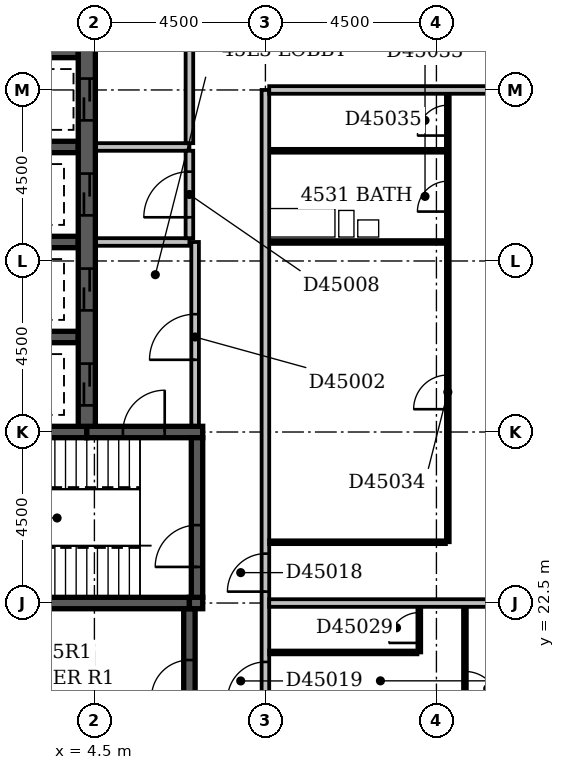
"""IFC4 building model, lengths in metres.
Left out: names, types, materials, properties, quantities, classifications, styles, units other than length and angle.
Written with IfcOpenShell. Run it as: python <this file> out.ifc"""

import sys

from ifc_helpers import new_model, si_unit, direction, frame, frame_2d, origin, place, context, subcontext, project, spatial, rectangle, extrude, element, fill, save


model = new_model("IFC4")
c1 = context("Model", 3, precision=1e-05, world=origin(), true_north=direction((0.0, 1.0)))
c2 = subcontext(c1, "Body", "Model", "MODEL_VIEW")
j1 = project(units=[si_unit("LENGTHUNIT", "METRE"), si_unit("PLANEANGLEUNIT", "RADIAN")], contexts=[c1])
p1 = place(None, origin())
s1 = spatial("IfcSite", under=j1, at=p1, CompositionType="ELEMENT")
p2 = place(p1, origin())
s2 = spatial("IfcBuilding", under=s1, at=p2, CompositionType="ELEMENT")
p3 = place(p2, frame((0.0, 0.0, 179.0)))
s3 = spatial("IfcBuildingStorey", under=s2, at=p3, CompositionType="ELEMENT", Elevation=179.0)
p4 = place(p3, frame((0.35, 22.5, -0.3), z_axis=(0.0, 0.0, 1.0), x_axis=(1.0, 0.0, 0.0)))
e1 = element("IfcWall", 1, at=p4, inside=s3, PredefinedType="SHEAR", context=c2, shape_type="SweptSolid", body=[
    extrude(rectangle(XDim=6.65, YDim=0.3, at=frame_2d((3.325, 0.0))), origin(), (0.0, 0.0, 1.0), 3.6),
])
p5 = place(p3, frame((0.35, 27.0, -0.3), z_axis=(0.0, 0.0, 1.0), x_axis=(1.0, 0.0, 0.0)))
e2 = element("IfcWall", 2, at=p5, inside=s3, PredefinedType="SHEAR", context=c2, shape_type="SweptSolid", body=[
    extrude(rectangle(XDim=3.95, YDim=0.3, at=frame_2d((1.975, 0.0))), origin(), (0.0, 0.0, 1.0), 3.6),
])
for number, where, z_axis, x_axis in (
    (3, (0.725, 29.5, -0.3), (0.0, 0.0, 1.0), (1.0, 0.0, 0.0)),
    (4, (0.725, 32.0, -0.3), (0.0, 0.0, 1.0), (1.0, 0.0, 0.0)),
    (5, (0.725, 34.5, -0.3), (0.0, 0.0, 1.0), (1.0, 0.0, 0.0)),
    (6, (0.725, 37.0, -0.3), (0.0, 0.0, 1.0), (1.0, 0.0, 0.0)),
):
    element("IfcWall", number, at=place(p3, frame(where, z_axis=z_axis, x_axis=x_axis)), inside=s3, PredefinedType="SHEAR", context=c2, shape_type="SweptSolid", body=[
        extrude(rectangle(XDim=3.35, YDim=0.3, at=frame_2d((1.675, 0.0))), origin(), (0.0, 0.0, 1.0), 3.6),
    ])
p6 = place(p3, frame((4.3, 27.0, -0.3), z_axis=(0.0, 0.0, 1.0), x_axis=(1.0, 0.0, 0.0)))
e7 = element("IfcWall", 7, at=p6, inside=s3, PredefinedType="SHEAR", context=c2, shape_type="SweptSolid", body=[
    extrude(rectangle(XDim=3.05, YDim=0.3, at=frame_2d((1.525, 0.0))), origin(), (0.0, 0.0, 1.0), 3.6),
])
p7 = place(p6, frame((0.95, 0.0, 0.3)))
e8 = element("IfcOpeningElement", 8, at=p7, cuts=e7, PredefinedType="OPENING", context=c2, shape_type="SweptSolid", body=[
    extrude(rectangle(XDim=1.1, YDim=2.1, at=frame_2d((0.55, 1.05))), frame((0.0, 0.162, 0.0), z_axis=(0.0, -1.0, 0.0), x_axis=(1.0, 0.0, 0.0)), (0.0, 0.0, 1.0), 0.324),
])
p8 = place(p3, frame((4.3, 27.15, -0.3), z_axis=(0.0, 0.0, 1.0), x_axis=(0.0, 1.0, 0.0)))
e9 = element("IfcWall", 9, at=p8, inside=s3, PredefinedType="SHEAR", context=c2, shape_type="SweptSolid", body=[
    extrude(rectangle(XDim=22.125, YDim=0.45, at=frame_2d((11.062, 0.0))), origin(), (0.0, 0.0, 1.0), 3.6),
])
p9 = place(p8, frame((3.05, 0.0, 0.3)))
e10 = element("IfcOpeningElement", 10, at=p9, cuts=e9, PredefinedType="OPENING", context=c2, shape_type="SweptSolid", body=[
    extrude(rectangle(XDim=1.1, YDim=2.1, at=frame_2d((0.55, 1.05))), frame((0.0, 0.237, 0.0), z_axis=(0.0, -1.0, 0.0), x_axis=(1.0, 0.0, 0.0)), (0.0, 0.0, 1.0), 0.474),
])
p10 = place(p8, frame((0.55, 0.0, 0.3)))
e11 = element("IfcOpeningElement", 11, at=p10, cuts=e9, PredefinedType="OPENING", context=c2, shape_type="SweptSolid", body=[
    extrude(rectangle(XDim=1.1, YDim=2.1, at=frame_2d((0.55, 1.05))), frame((0.0, 0.237, 0.0), z_axis=(0.0, -1.0, 0.0), x_axis=(1.0, 0.0, 0.0)), (0.0, 0.0, 1.0), 0.474),
])
p11 = place(p8, frame((20.55, 0.0, 0.3)))
e12 = element("IfcOpeningElement", 12, at=p11, cuts=e9, PredefinedType="OPENING", context=c2, shape_type="SweptSolid", body=[
    extrude(rectangle(XDim=1.1, YDim=2.1, at=frame_2d((0.55, 1.05))), frame((0.0, 0.237, 0.0), z_axis=(0.0, -1.0, 0.0), x_axis=(1.0, 0.0, 0.0)), (0.0, 0.0, 1.0), 0.474),
])
p12 = place(p8, frame((18.05, 0.0, 0.3)))
e13 = element("IfcOpeningElement", 13, at=p12, cuts=e9, PredefinedType="OPENING", context=c2, shape_type="SweptSolid", body=[
    extrude(rectangle(XDim=1.1, YDim=2.1, at=frame_2d((0.55, 1.05))), frame((0.0, 0.237, 0.0), z_axis=(0.0, -1.0, 0.0), x_axis=(1.0, 0.0, 0.0)), (0.0, 0.0, 1.0), 0.474),
])
p13 = place(p8, frame((15.55, 0.0, 0.3)))
e14 = element("IfcOpeningElement", 14, at=p13, cuts=e9, PredefinedType="OPENING", context=c2, shape_type="SweptSolid", body=[
    extrude(rectangle(XDim=1.1, YDim=2.1, at=frame_2d((0.55, 1.05))), frame((0.0, 0.237, 0.0), z_axis=(0.0, -1.0, 0.0), x_axis=(1.0, 0.0, 0.0)), (0.0, 0.0, 1.0), 0.474),
])
p14 = place(p8, frame((13.05, 0.0, 0.3)))
e15 = element("IfcOpeningElement", 15, at=p14, cuts=e9, PredefinedType="OPENING", context=c2, shape_type="SweptSolid", body=[
    extrude(rectangle(XDim=1.1, YDim=2.1, at=frame_2d((0.55, 1.05))), frame((0.0, 0.237, 0.0), z_axis=(0.0, -1.0, 0.0), x_axis=(1.0, 0.0, 0.0)), (0.0, 0.0, 1.0), 0.474),
])
p15 = place(p8, frame((10.55, 0.0, 0.3)))
e16 = element("IfcOpeningElement", 16, at=p15, cuts=e9, PredefinedType="OPENING", context=c2, shape_type="SweptSolid", body=[
    extrude(rectangle(XDim=1.1, YDim=2.1, at=frame_2d((0.55, 1.05))), frame((0.0, 0.237, 0.0), z_axis=(0.0, -1.0, 0.0), x_axis=(1.0, 0.0, 0.0)), (0.0, 0.0, 1.0), 0.474),
])
p16 = place(p8, frame((8.05, 0.0, 0.3)))
e17 = element("IfcOpeningElement", 17, at=p16, cuts=e9, PredefinedType="OPENING", context=c2, shape_type="SweptSolid", body=[
    extrude(rectangle(XDim=1.1, YDim=2.1, at=frame_2d((0.55, 1.05))), frame((0.0, 0.237, 0.0), z_axis=(0.0, -1.0, 0.0), x_axis=(1.0, 0.0, 0.0)), (0.0, 0.0, 1.0), 0.474),
])
p17 = place(p8, frame((5.55, 0.0, 0.3)))
e18 = element("IfcOpeningElement", 18, at=p17, cuts=e9, PredefinedType="OPENING", context=c2, shape_type="SweptSolid", body=[
    extrude(rectangle(XDim=1.1, YDim=2.1, at=frame_2d((0.55, 1.05))), frame((0.0, 0.237, 0.0), z_axis=(0.0, -1.0, 0.0), x_axis=(1.0, 0.0, 0.0)), (0.0, 0.0, 1.0), 0.474),
])
p18 = place(p3, frame((7.0, 18.65, -0.3), z_axis=(0.0, 0.0, 1.0), x_axis=(0.0, 1.0, 0.0)))
e19 = element("IfcWall", 19, at=p18, inside=s3, PredefinedType="SHEAR", context=c2, shape_type="SweptSolid", body=[
    extrude(rectangle(XDim=3.7, YDim=0.3, at=frame_2d((1.85, 0.0))), origin(), (0.0, 0.0, 1.0), 3.6),
])
p19 = place(p18, frame((1.35, 0.0, 0.3)))
e20 = element("IfcOpeningElement", 20, at=p19, cuts=e19, PredefinedType="OPENING", context=c2, shape_type="SweptSolid", body=[
    extrude(rectangle(XDim=1.0, YDim=2.1, at=frame_2d((0.5, 1.05))), frame((0.0, 0.162, 0.0), z_axis=(0.0, -1.0, 0.0), x_axis=(1.0, 0.0, 0.0)), (0.0, 0.0, 1.0), 0.324),
])
p20 = place(p3, frame((7.0, 22.5, -0.3), z_axis=(0.0, 0.0, 1.0), x_axis=(1.0, 0.0, 0.0)))
e21 = element("IfcWall", 21, at=p20, inside=s3, PredefinedType="SHEAR", context=c2, shape_type="SweptSolid", body=[
    extrude(rectangle(XDim=0.35, YDim=0.3, at=frame_2d((0.175, 0.0))), origin(), (0.0, 0.0, 1.0), 3.6),
])
p21 = place(p3, frame((7.2, 22.65, -0.3), z_axis=(0.0, 0.0, 1.0), x_axis=(0.0, 1.0, 0.0)))
e22 = element("IfcWall", 22, at=p21, inside=s3, PredefinedType="SHEAR", context=c2, shape_type="SweptSolid", body=[
    extrude(rectangle(XDim=4.2, YDim=0.3, at=frame_2d((2.1, 0.0))), origin(), (0.0, 0.0, 1.0), 3.6),
])
p22 = place(p21, frame((0.8, 0.0, 0.3)))
e23 = element("IfcOpeningElement", 23, at=p22, cuts=e22, PredefinedType="OPENING", context=c2, shape_type="SweptSolid", body=[
    extrude(rectangle(XDim=1.1, YDim=2.1, at=frame_2d((0.55, 1.05))), frame((0.0, 0.162, 0.0), z_axis=(0.0, -1.0, 0.0), x_axis=(1.0, 0.0, 0.0)), (0.0, 0.0, 1.0), 0.324),
])
p23 = place(p3, frame((4.545, 34.5, 0.0), z_axis=(0.0, 0.0, 1.0), x_axis=(1.0, 0.0, 0.0)))
e24 = element("IfcWall", 24, at=p23, inside=s3, PredefinedType="PARTITIONING", context=c2, shape_type="SweptSolid", body=[
    extrude(rectangle(XDim=2.455, YDim=0.2, at=frame_2d((1.228, 0.0))), origin(), (0.0, 0.0, 1.0), 3.3),
])
p24 = place(p3, frame((7.0, 34.6, 0.0), z_axis=(0.0, 0.0, 1.0), x_axis=(0.0, 1.0, 0.0)))
e25 = element("IfcWall", 25, at=p24, inside=s3, PredefinedType="PARTITIONING", context=c2, shape_type="SweptSolid", body=[
    extrude(rectangle(XDim=14.9, YDim=0.2, at=frame_2d((7.45, 0.0))), origin(), (0.0, 0.0, 1.0), 3.3),
])
p25 = place(p24, frame((2.8, 0.0, 0.0)))
e26 = element("IfcOpeningElement", 26, at=p25, cuts=e25, PredefinedType="OPENING", context=c2, shape_type="SweptSolid", body=[
    extrude(rectangle(XDim=1.2, YDim=2.1, at=frame_2d((0.6, 1.05))), frame((0.0, 0.112, 0.0), z_axis=(0.0, -1.0, 0.0), x_axis=(1.0, 0.0, 0.0)), (0.0, 0.0, 1.0), 0.224),
])
p26 = place(p24, frame((9.8, 0.0, 0.0)))
e27 = element("IfcOpeningElement", 27, at=p26, cuts=e25, PredefinedType="OPENING", context=c2, shape_type="SweptSolid", body=[
    extrude(rectangle(XDim=1.2, YDim=2.1, at=frame_2d((0.6, 1.05))), frame((0.0, 0.112, 0.0), z_axis=(0.0, -1.0, 0.0), x_axis=(1.0, 0.0, 0.0)), (0.0, 0.0, 1.0), 0.224),
])
p27 = place(p3, frame((4.545, 32.0, 0.0), z_axis=(0.0, 0.0, 1.0), x_axis=(1.0, 0.0, 0.0)))
e28 = element("IfcWall", 28, at=p27, inside=s3, PredefinedType="PARTITIONING", context=c2, shape_type="SweptSolid", body=[
    extrude(rectangle(XDim=2.455, YDim=0.2, at=frame_2d((1.228, 0.0))), origin(), (0.0, 0.0, 1.0), 3.3),
])
p28 = place(p3, frame((7.0, 32.1, 0.0), z_axis=(0.0, 0.0, 1.0), x_axis=(0.0, 1.0, 0.0)))
e29 = element("IfcWall", 29, at=p28, inside=s3, PredefinedType="PARTITIONING", context=c2, shape_type="SweptSolid", body=[
    extrude(rectangle(XDim=2.3, YDim=0.2, at=frame_2d((1.15, 0.0))), origin(), (0.0, 0.0, 1.0), 3.3),
])
p29 = place(p28, frame((0.55, 0.0, 0.0)))
e30 = element("IfcOpeningElement", 30, at=p29, cuts=e29, PredefinedType="OPENING", context=c2, shape_type="SweptSolid", body=[
    extrude(rectangle(XDim=1.2, YDim=2.1, at=frame_2d((0.6, 1.05))), frame((0.0, 0.112, 0.0), z_axis=(0.0, -1.0, 0.0), x_axis=(1.0, 0.0, 0.0)), (0.0, 0.0, 1.0), 0.224),
])
p30 = place(p3, frame((7.15, 27.17, 0.0), z_axis=(0.0, 0.0, 1.0), x_axis=(0.0, 1.0, 0.0)))
e31 = element("IfcWall", 31, at=p30, inside=s3, PredefinedType="PARTITIONING", context=c2, shape_type="SweptSolid", body=[
    extrude(rectangle(XDim=4.83, YDim=0.2, at=frame_2d((2.415, 0.0))), origin(), (0.0, 0.0, 1.0), 3.3),
])
p31 = place(p30, frame((1.73, 0.0, 0.0)))
e32 = element("IfcOpeningElement", 32, at=p31, cuts=e31, PredefinedType="OPENING", context=c2, shape_type="SweptSolid", body=[
    extrude(rectangle(XDim=1.2, YDim=2.1, at=frame_2d((0.6, 1.05))), frame((0.0, 0.112, 0.0), z_axis=(0.0, -1.0, 0.0), x_axis=(1.0, 0.0, 0.0)), (0.0, 0.0, 1.0), 0.224),
])
p32 = place(p3, frame((9.0, 5.0, 0.0), z_axis=(0.0, 0.0, 1.0), x_axis=(0.0, 1.0, 0.0)))
e33 = element("IfcWall", 33, at=p32, inside=s3, PredefinedType="PARTITIONING", context=c2, shape_type="SweptSolid", body=[
    extrude(rectangle(XDim=31.0, YDim=0.2, at=frame_2d((15.5, 0.0))), origin(), (0.0, 0.0, 1.0), 3.3),
])
p33 = place(p32, frame((17.8, 0.0, 0.0)))
e34 = element("IfcOpeningElement", 34, at=p33, cuts=e33, PredefinedType="OPENING", context=c2, shape_type="SweptSolid", body=[
    extrude(rectangle(XDim=1.0, YDim=2.1, at=frame_2d((0.5, 1.05))), frame((0.0, 0.112, 0.0), z_axis=(0.0, -1.0, 0.0), x_axis=(1.0, 0.0, 0.0)), (0.0, 0.0, 1.0), 0.224),
])
p34 = place(p32, frame((14.95, 0.0, 0.0)))
e35 = element("IfcOpeningElement", 35, at=p34, cuts=e33, PredefinedType="OPENING", context=c2, shape_type="SweptSolid", body=[
    extrude(rectangle(XDim=1.0, YDim=2.1, at=frame_2d((0.5, 1.05))), frame((0.0, 0.112, 0.0), z_axis=(0.0, -1.0, 0.0), x_axis=(1.0, 0.0, 0.0)), (0.0, 0.0, 1.0), 0.224),
])
p35 = place(p32, frame((9.3, 0.0, 0.0)))
e36 = element("IfcOpeningElement", 36, at=p35, cuts=e33, PredefinedType="OPENING", context=c2, shape_type="SweptSolid", body=[
    extrude(rectangle(XDim=1.0, YDim=2.1, at=frame_2d((0.5, 1.05))), frame((0.0, 0.112, 0.0), z_axis=(0.0, -1.0, 0.0), x_axis=(1.0, 0.0, 0.0)), (0.0, 0.0, 1.0), 0.224),
])
p36 = place(p32, frame((1.5, 0.0, 0.0)))
e37 = element("IfcOpeningElement", 37, at=p36, cuts=e33, PredefinedType="OPENING", context=c2, shape_type="SweptSolid", body=[
    extrude(rectangle(XDim=0.9, YDim=2.1, at=frame_2d((0.45, 1.05))), frame((0.0, 0.112, 0.0), z_axis=(0.0, -1.0, 0.0), x_axis=(1.0, 0.0, 0.0)), (0.0, 0.0, 1.0), 0.224),
])
p37 = place(p3, frame((14.25, 18.1, 0.0), z_axis=(0.0, 0.0, 1.0), x_axis=(0.0, 1.0, 0.0)))
e38 = element("IfcWall", 38, at=p37, inside=s3, PredefinedType="PARTITIONING", context=c2, shape_type="SweptSolid", body=[
    extrude(rectangle(XDim=4.3, YDim=0.1, at=frame_2d((2.15, 0.0))), origin(), (0.0, 0.0, 1.0), 3.3),
])
p38 = place(p37, frame((1.7, 0.0, 0.0)))
e39 = element("IfcOpeningElement", 39, at=p38, cuts=e38, PredefinedType="OPENING", context=c2, shape_type="SweptSolid", body=[
    extrude(rectangle(XDim=0.9, YDim=2.1, at=frame_2d((0.45, 1.05))), frame((0.0, 0.062, 0.0), z_axis=(0.0, -1.0, 0.0), x_axis=(1.0, 0.0, 0.0)), (0.0, 0.0, 1.0), 0.124),
])
p39 = place(p3, frame((9.1, 21.2, 0.0), z_axis=(0.0, 0.0, 1.0), x_axis=(1.0, 0.0, 0.0)))
e40 = element("IfcWall", 40, at=p39, inside=s3, PredefinedType="PARTITIONING", context=c2, shape_type="SweptSolid", body=[
    extrude(rectangle(XDim=3.9, YDim=0.1, at=frame_2d((1.95, 0.0))), origin(), (0.0, 0.0, 1.0), 3.3),
])
p40 = place(p3, frame((13.05, 21.2, 0.0), z_axis=(0.0, 0.0, 1.0), x_axis=(0.0, 1.0, 0.0)))
e41 = element("IfcWall", 41, at=p40, inside=s3, PredefinedType="PARTITIONING", context=c2, shape_type="SweptSolid", body=[
    extrude(rectangle(XDim=1.2, YDim=0.1, at=frame_2d((0.6, 0.0))), origin(), (0.0, 0.0, 1.0), 3.3),
])
p41 = place(p40, frame((0.25, 0.0, 0.0)))
e42 = element("IfcOpeningElement", 42, at=p41, cuts=e41, PredefinedType="OPENING", context=c2, shape_type="SweptSolid", body=[
    extrude(rectangle(XDim=0.8, YDim=2.1, at=frame_2d((0.4, 1.05))), frame((0.0, 0.062, 0.0), z_axis=(0.0, -1.0, 0.0), x_axis=(1.0, 0.0, 0.0)), (0.0, 0.0, 1.0), 0.124),
])
p42 = place(p3, frame((9.1, 22.5, 0.0), z_axis=(0.0, 0.0, 1.0), x_axis=(1.0, 0.0, 0.0)))
e43 = element("IfcWall", 43, at=p42, inside=s3, PredefinedType="PARTITIONING", context=c2, shape_type="SweptSolid", body=[
    extrude(rectangle(XDim=12.95, YDim=0.2, at=frame_2d((6.475, 0.0))), origin(), (0.0, 0.0, 1.0), 3.3),
])
p43 = place(p3, frame((9.1, 24.1, 0.0), z_axis=(0.0, 0.0, 1.0), x_axis=(1.0, 0.0, 0.0)))
e44 = element("IfcWall", 44, at=p43, inside=s3, PredefinedType="PARTITIONING", context=c2, shape_type="SweptSolid", body=[
    extrude(rectangle(XDim=4.65, YDim=0.1, at=frame_2d((2.325, 0.0))), origin(), (0.0, 0.0, 1.0), 3.3),
])
p44 = place(p3, frame((13.8, 24.1, 0.0), z_axis=(0.0, 0.0, 1.0), x_axis=(0.0, 1.0, 0.0)))
e45 = element("IfcWall", 45, at=p44, inside=s3, PredefinedType="PARTITIONING", context=c2, shape_type="SweptSolid", body=[
    extrude(rectangle(XDim=11.8, YDim=0.1, at=frame_2d((5.9, 0.0))), origin(), (0.0, 0.0, 1.0), 3.3),
])
p45 = place(p44, frame((8.7, 0.0, 0.0)))
e46 = element("IfcOpeningElement", 46, at=p45, cuts=e45, PredefinedType="OPENING", context=c2, shape_type="SweptSolid", body=[
    extrude(rectangle(XDim=0.8, YDim=2.1, at=frame_2d((0.4, 1.05))), frame((0.0, 0.062, 0.0), z_axis=(0.0, -1.0, 0.0), x_axis=(1.0, 0.0, 0.0)), (0.0, 0.0, 1.0), 0.124),
])
p46 = place(p44, frame((3.5, 0.0, 0.0)))
e47 = element("IfcOpeningElement", 47, at=p46, cuts=e45, PredefinedType="OPENING", context=c2, shape_type="SweptSolid", body=[
    extrude(rectangle(XDim=0.9, YDim=2.1, at=frame_2d((0.45, 1.05))), frame((0.0, 0.062, 0.0), z_axis=(0.0, -1.0, 0.0), x_axis=(1.0, 0.0, 0.0)), (0.0, 0.0, 1.0), 0.124),
])
p47 = place(p44, frame((10.7, 0.0, 0.0)))
e48 = element("IfcOpeningElement", 48, at=p47, cuts=e45, PredefinedType="OPENING", context=c2, shape_type="SweptSolid", body=[
    extrude(rectangle(XDim=0.8, YDim=2.1, at=frame_2d((0.4, 1.05))), frame((0.0, 0.062, 0.0), z_axis=(0.0, -1.0, 0.0), x_axis=(1.0, 0.0, 0.0)), (0.0, 0.0, 1.0), 0.124),
])
for number, where, z_axis, x_axis in (
    (49, (9.1, 32.0, 0.0), (0.0, 0.0, 1.0), (1.0, 0.0, 0.0)),
    (50, (9.1, 34.4, 0.0), (0.0, 0.0, 1.0), (1.0, 0.0, 0.0)),
):
    element("IfcWall", number, at=place(p3, frame(where, z_axis=z_axis, x_axis=x_axis)), inside=s3, PredefinedType="PLUMBINGWALL", context=c2, shape_type="SweptSolid", body=[
        extrude(rectangle(XDim=4.65, YDim=0.1, at=frame_2d((2.325, 0.0))), origin(), (0.0, 0.0, 1.0), 3.3),
    ])
p48 = place(p3, frame((9.1, 36.0, 0.0), z_axis=(0.0, 0.0, 1.0), x_axis=(1.0, 0.0, 0.0)))
e51 = element("IfcWall", 51, at=p48, inside=s3, PredefinedType="PARTITIONING", context=c2, shape_type="SweptSolid", body=[
    extrude(rectangle(XDim=12.95, YDim=0.2, at=frame_2d((6.475, 0.0))), origin(), (0.0, 0.0, 1.0), 3.3),
])
p49 = place(p31, origin())
e52 = element("IfcDoor", 52, at=p49, inside=s3, OperationType="SINGLE_SWING_LEFT", PredefinedType="DOOR", context=c2, shape_type="SweptSolid", body=[
    extrude(rectangle(XDim=1.2, YDim=2.1, at=frame_2d((0.6, 1.05))), frame((0.0, 0.025, 0.0), z_axis=(0.0, -1.0, 0.0), x_axis=(1.0, 0.0, 0.0)), (0.0, 0.0, 1.0), 0.05),
])
fill(e32, e52)
p50 = place(p9, origin())
e53 = element("IfcDoor", 53, at=p50, inside=s3, OperationType="SLIDING_TO_LEFT", PredefinedType="DOOR", context=c2, shape_type="SweptSolid", body=[
    extrude(rectangle(XDim=1.1, YDim=2.1, at=frame_2d((0.55, 1.05))), frame((0.0, 0.025, 0.0), z_axis=(0.0, -1.0, 0.0), x_axis=(1.0, 0.0, 0.0)), (0.0, 0.0, 1.0), 0.05),
])
fill(e10, e53)
p51 = place(p10, origin())
e54 = element("IfcDoor", 54, at=p51, inside=s3, OperationType="SLIDING_TO_LEFT", PredefinedType="DOOR", context=c2, shape_type="SweptSolid", body=[
    extrude(rectangle(XDim=1.1, YDim=2.1, at=frame_2d((0.55, 1.05))), frame((0.0, 0.025, 0.0), z_axis=(0.0, -1.0, 0.0), x_axis=(1.0, 0.0, 0.0)), (0.0, 0.0, 1.0), 0.05),
])
fill(e11, e54)
p52 = place(p16, origin())
e55 = element("IfcDoor", 55, at=p52, inside=s3, OperationType="SLIDING_TO_LEFT", PredefinedType="DOOR", context=c2, shape_type="SweptSolid", body=[
    extrude(rectangle(XDim=1.1, YDim=2.1, at=frame_2d((0.55, 1.05))), frame((0.0, 0.025, 0.0), z_axis=(0.0, -1.0, 0.0), x_axis=(1.0, 0.0, 0.0)), (0.0, 0.0, 1.0), 0.05),
])
fill(e17, e55)
p53 = place(p29, origin())
e56 = element("IfcDoor", 56, at=p53, inside=s3, OperationType="SINGLE_SWING_LEFT", PredefinedType="DOOR", context=c2, shape_type="SweptSolid", body=[
    extrude(rectangle(XDim=1.2, YDim=2.1, at=frame_2d((0.6, 1.05))), frame((0.0, 0.025, 0.0), z_axis=(0.0, -1.0, 0.0), x_axis=(1.0, 0.0, 0.0)), (0.0, 0.0, 1.0), 0.05),
])
fill(e30, e56)
p54 = place(p17, origin())
e57 = element("IfcDoor", 57, at=p54, inside=s3, OperationType="SLIDING_TO_LEFT", PredefinedType="DOOR", context=c2, shape_type="SweptSolid", body=[
    extrude(rectangle(XDim=1.1, YDim=2.1, at=frame_2d((0.55, 1.05))), frame((0.0, 0.025, 0.0), z_axis=(0.0, -1.0, 0.0), x_axis=(1.0, 0.0, 0.0)), (0.0, 0.0, 1.0), 0.05),
])
fill(e18, e57)
p55 = place(p19, origin())
e58 = element("IfcDoor", 58, at=p55, inside=s3, OperationType="SINGLE_SWING_LEFT", PredefinedType="DOOR", context=c2, shape_type="SweptSolid", body=[
    extrude(rectangle(XDim=1.0, YDim=2.1, at=frame_2d((0.5, 1.05))), frame((0.0, 0.025, 0.0), z_axis=(0.0, -1.0, 0.0), x_axis=(1.0, 0.0, 0.0)), (0.0, 0.0, 1.0), 0.05),
])
fill(e20, e58)
p56 = place(p7, frame((1.1, 0.0, 0.0), z_axis=(0.0, 0.0, 1.0), x_axis=(-1.0, 0.0, 0.0)))
e59 = element("IfcDoor", 59, at=p56, inside=s3, OperationType="SINGLE_SWING_LEFT", PredefinedType="DOOR", context=c2, shape_type="SweptSolid", body=[
    extrude(rectangle(XDim=1.1, YDim=2.1, at=frame_2d((0.55, 1.05))), frame((0.0, 0.025, 0.0), z_axis=(0.0, -1.0, 0.0), x_axis=(1.0, 0.0, 0.0)), (0.0, 0.0, 1.0), 0.05),
])
fill(e8, e59)
p57 = place(p22, origin())
e60 = element("IfcDoor", 60, at=p57, inside=s3, OperationType="SINGLE_SWING_LEFT", PredefinedType="DOOR", context=c2, shape_type="SweptSolid", body=[
    extrude(rectangle(XDim=1.1, YDim=2.1, at=frame_2d((0.55, 1.05))), frame((0.0, 0.025, 0.0), z_axis=(0.0, -1.0, 0.0), x_axis=(1.0, 0.0, 0.0)), (0.0, 0.0, 1.0), 0.05),
])
fill(e23, e60)
p58 = place(p33, origin())
e61 = element("IfcDoor", 61, at=p58, inside=s3, OperationType="SINGLE_SWING_LEFT", PredefinedType="DOOR", context=c2, shape_type="SweptSolid", body=[
    extrude(rectangle(XDim=1.0, YDim=2.1, at=frame_2d((0.5, 1.05))), frame((0.0, 0.025, 0.0), z_axis=(0.0, -1.0, 0.0), x_axis=(1.0, 0.0, 0.0)), (0.0, 0.0, 1.0), 0.05),
])
fill(e34, e61)
p59 = place(p34, origin())
e62 = element("IfcDoor", 62, at=p59, inside=s3, OperationType="SINGLE_SWING_LEFT", PredefinedType="DOOR", context=c2, shape_type="SweptSolid", body=[
    extrude(rectangle(XDim=1.0, YDim=2.1, at=frame_2d((0.5, 1.05))), frame((0.0, 0.025, 0.0), z_axis=(0.0, -1.0, 0.0), x_axis=(1.0, 0.0, 0.0)), (0.0, 0.0, 1.0), 0.05),
])
fill(e35, e62)
p60 = place(p38, frame((0.9, 0.0, 0.0), z_axis=(0.0, 0.0, 1.0), x_axis=(-1.0, 0.0, 0.0)))
e63 = element("IfcDoor", 63, at=p60, inside=s3, OperationType="SINGLE_SWING_RIGHT", PredefinedType="DOOR", context=c2, shape_type="SweptSolid", body=[
    extrude(rectangle(XDim=0.9, YDim=2.1, at=frame_2d((0.45, 1.05))), frame((0.0, 0.025, 0.0), z_axis=(0.0, -1.0, 0.0), x_axis=(1.0, 0.0, 0.0)), (0.0, 0.0, 1.0), 0.05),
])
fill(e39, e63)
p61 = place(p41, origin())
e64 = element("IfcDoor", 64, at=p61, inside=s3, OperationType="SINGLE_SWING_LEFT", PredefinedType="DOOR", context=c2, shape_type="SweptSolid", body=[
    extrude(rectangle(XDim=0.8, YDim=2.1, at=frame_2d((0.4, 1.05))), frame((0.0, 0.025, 0.0), z_axis=(0.0, -1.0, 0.0), x_axis=(1.0, 0.0, 0.0)), (0.0, 0.0, 1.0), 0.05),
])
fill(e42, e64)
p62 = place(p45, origin())
e65 = element("IfcDoor", 65, at=p62, inside=s3, OperationType="SINGLE_SWING_LEFT", PredefinedType="DOOR", context=c2, shape_type="SweptSolid", body=[
    extrude(rectangle(XDim=0.8, YDim=2.1, at=frame_2d((0.4, 1.05))), frame((0.0, 0.025, 0.0), z_axis=(0.0, -1.0, 0.0), x_axis=(1.0, 0.0, 0.0)), (0.0, 0.0, 1.0), 0.05),
])
fill(e46, e65)
p63 = place(p46, origin())
e66 = element("IfcDoor", 66, at=p63, inside=s3, OperationType="SINGLE_SWING_LEFT", PredefinedType="DOOR", context=c2, shape_type="SweptSolid", body=[
    extrude(rectangle(XDim=0.9, YDim=2.1, at=frame_2d((0.45, 1.05))), frame((0.0, 0.025, 0.0), z_axis=(0.0, -1.0, 0.0), x_axis=(1.0, 0.0, 0.0)), (0.0, 0.0, 1.0), 0.05),
])
fill(e47, e66)
p64 = place(p47, origin())
e67 = element("IfcDoor", 67, at=p64, inside=s3, OperationType="SINGLE_SWING_LEFT", PredefinedType="DOOR", context=c2, shape_type="SweptSolid", body=[
    extrude(rectangle(XDim=0.8, YDim=2.1, at=frame_2d((0.4, 1.05))), frame((0.0, 0.025, 0.0), z_axis=(0.0, -1.0, 0.0), x_axis=(1.0, 0.0, 0.0)), (0.0, 0.0, 1.0), 0.05),
])
fill(e48, e67)
save(model, sys.argv[1])
